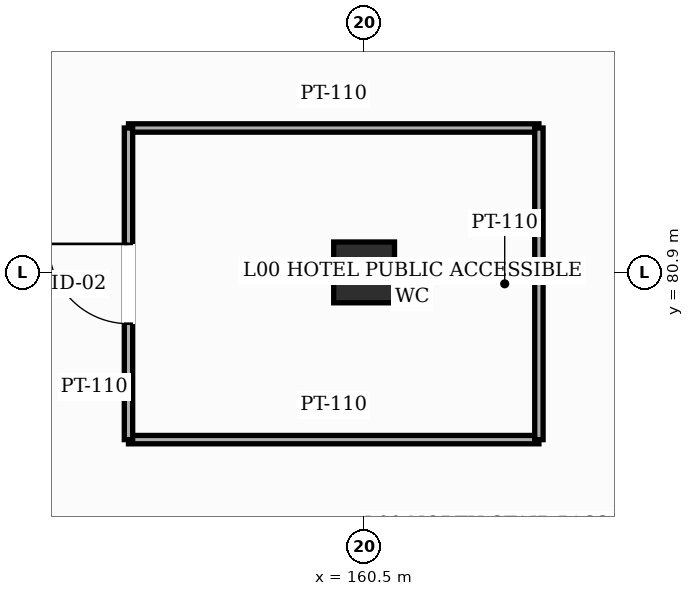
"""IFC4 building model, lengths in metres.
Left out: names, types, materials, properties, quantities, classifications, styles, units other than length and angle.
Written with IfcOpenShell. Run it as: python <this file> out.ifc"""

import sys

from ifc_helpers import new_model, si_unit, direction, frame, frame_2d, origin, origin_2d, place, context, subcontext, project, spatial, rectangle, hollow_rectangle, extrude, element, fill, save


model = new_model("IFC4")
c1 = context("Model", 3, precision=1e-05, world=origin(), true_north=direction((0.0, 1.0)))
c2 = subcontext(c1, "Body", "Model", "MODEL_VIEW")
j1 = project(units=[si_unit("LENGTHUNIT", "METRE"), si_unit("PLANEANGLEUNIT", "RADIAN")], contexts=[c1])
p1 = place(None, origin())
s1 = spatial("IfcSite", under=j1, at=p1, CompositionType="ELEMENT")
p2 = place(p1, origin())
s2 = spatial("IfcBuilding", under=s1, at=p2, CompositionType="ELEMENT")
p3 = place(p2, origin())
s3 = spatial("IfcBuildingStorey", under=s2, at=p3, CompositionType="ELEMENT", Elevation=0.0)
p4 = place(p3, frame((160.5, 80.9, 0.0), z_axis=(0.0, 0.0, 1.0), x_axis=(1.0, 0.0, 0.0)))
e1 = element("IfcColumn", 1, at=p4, inside=s3, PredefinedType="COLUMN", context=c2, shape_type="SweptSolid", body=[
    extrude(hollow_rectangle(XDim=0.8, YDim=0.8, WallThickness=0.032, InnerFilletRadius=0.032, OuterFilletRadius=0.064, at=origin_2d()), origin(), (0.0, 0.0, 1.0), 5.4),
])
for number, where, z_axis, x_axis in (
    (2, (157.4, 78.7, 0.0), (0.0, 0.0, 1.0), (1.0, 0.0, 0.0)),
    (3, (157.4, 82.8, 0.0), (0.0, 0.0, 1.0), (1.0, 0.0, 0.0)),
):
    element("IfcWall", number, at=place(p3, frame(where, z_axis=z_axis, x_axis=x_axis)), inside=s3, PredefinedType="PARTITIONING", context=c2, shape_type="SweptSolid", body=[
        extrude(rectangle(XDim=5.4, YDim=0.11, at=frame_2d((2.7, 0.0))), origin(), (0.0, 0.0, 1.0), 5.135),
    ])
p5 = place(p3, frame((157.4, 78.7, 0.0), z_axis=(0.0, 0.0, 1.0), x_axis=(0.0, 1.0, 0.0)))
e4 = element("IfcWall", 4, at=p5, inside=s3, PredefinedType="PARTITIONING", context=c2, shape_type="SweptSolid", body=[
    extrude(rectangle(XDim=4.1, YDim=0.11, at=frame_2d((2.05, 0.0))), origin(), (0.0, 0.0, 1.0), 5.135),
])
p6 = place(p5, frame((1.525, 0.0, 0.0)))
e5 = element("IfcOpeningElement", 5, at=p6, cuts=e4, PredefinedType="OPENING", context=c2, shape_type="SweptSolid", body=[
    extrude(rectangle(XDim=1.05, YDim=2.2, at=frame_2d((0.525, 1.1))), frame((0.0, 0.065, 0.0), z_axis=(0.0, -1.0, 0.0), x_axis=(1.0, 0.0, 0.0)), (0.0, 0.0, 1.0), 0.13),
])
p7 = place(p3, frame((162.8, 78.7, 0.0), z_axis=(0.0, 0.0, 1.0), x_axis=(0.0, 1.0, 0.0)))
e6 = element("IfcWall", 6, at=p7, inside=s3, PredefinedType="PARTITIONING", context=c2, shape_type="SweptSolid", body=[
    extrude(rectangle(XDim=4.1, YDim=0.11, at=frame_2d((2.05, 0.0))), origin(), (0.0, 0.0, 1.0), 5.135),
])
p8 = place(p6, origin())
e7 = element("IfcDoor", 7, at=p8, inside=s3, OperationType="SINGLE_SWING_RIGHT", PredefinedType="DOOR", context=c2, shape_type="SweptSolid", body=[
    extrude(rectangle(XDim=1.05, YDim=2.2, at=frame_2d((0.525, 1.1))), frame((0.0, 0.025, 0.0), z_axis=(0.0, -1.0, 0.0), x_axis=(1.0, 0.0, 0.0)), (0.0, 0.0, 1.0), 0.05),
])
fill(e5, e7)
save(model, sys.argv[1])
